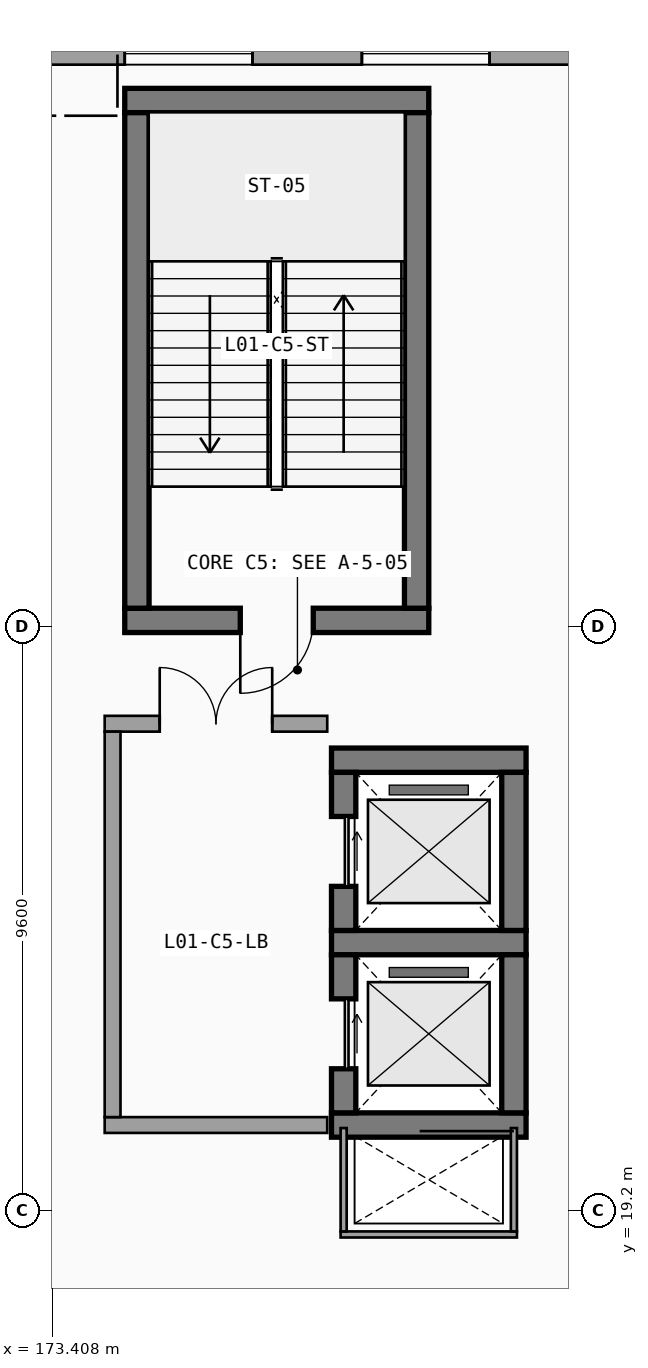
"""IFC4 building model, lengths in metres.
Left out: names, types, materials, properties, quantities, classifications, styles, units other than length and angle.
Written with IfcOpenShell. Run it as: python <this file> out.ifc"""

import sys

from ifc_helpers import new_model, si_unit, direction, frame, frame_2d, origin, place, context, subcontext, project, spatial, rectangle, extrude, element, fill, save


model = new_model("IFC4")
c1 = context("Model", 3, precision=1e-05, world=origin(), true_north=direction((0.0, 1.0)))
c2 = subcontext(c1, "Body", "Model", "MODEL_VIEW")
j1 = project(units=[si_unit("LENGTHUNIT", "METRE"), si_unit("PLANEANGLEUNIT", "RADIAN")], contexts=[c1])
p1 = place(None, origin())
s1 = spatial("IfcSite", under=j1, at=p1, CompositionType="ELEMENT")
p2 = place(p1, origin())
s2 = spatial("IfcBuilding", under=s1, at=p2, CompositionType="ELEMENT")
p3 = place(p2, frame((0.0, 0.0, 4.8)))
s3 = spatial("IfcBuildingStorey", under=s2, at=p3, CompositionType="ELEMENT", Elevation=4.8)
p4 = place(p3, frame((182.4, 38.22, 0.0), z_axis=(0.0, 0.0, 1.0), x_axis=(-1.0, 0.0, 0.0)))
e1 = element("IfcWall", 1, at=p4, inside=s3, PredefinedType="SOLIDWALL", context=c2, shape_type="SweptSolid", body=[
    extrude(rectangle(XDim=9.6, YDim=0.36, at=frame_2d((4.8, 0.0))), origin(), (0.0, 0.0, 1.0), 3.758),
])
p5 = place(p4, frame((3.9, 0.0, 0.9), z_axis=(0.0, 0.0, 1.0), x_axis=(-1.0, 0.0, 0.0)))
e2 = element("IfcOpeningElement", 2, at=p5, cuts=e1, PredefinedType="OPENING", context=c2, shape_type="SweptSolid", body=[
    extrude(rectangle(XDim=2.1, YDim=2.4, at=frame_2d((1.05, 1.2))), frame((0.0, 0.19, 0.0), z_axis=(0.0, -1.0, 0.0), x_axis=(1.0, 0.0, 0.0)), (0.0, 0.0, 1.0), 0.38),
])
p6 = place(p4, frame((7.8, 0.0, 0.9), z_axis=(0.0, 0.0, 1.0), x_axis=(-1.0, 0.0, 0.0)))
e3 = element("IfcOpeningElement", 3, at=p6, cuts=e1, PredefinedType="OPENING", context=c2, shape_type="SweptSolid", body=[
    extrude(rectangle(XDim=2.1, YDim=2.4, at=frame_2d((1.05, 1.2))), frame((0.0, 0.19, 0.0), z_axis=(0.0, -1.0, 0.0), x_axis=(1.0, 0.0, 0.0)), (0.0, 0.0, 1.0), 0.38),
])
p7 = place(p3, frame((174.6, 28.9, 0.0), z_axis=(0.0, 0.0, 1.0), x_axis=(1.0, 0.0, 0.0)))
e4 = element("IfcWall", 4, at=p7, inside=s3, PredefinedType="SHEAR", context=c2, shape_type="SweptSolid", body=[
    extrude(rectangle(XDim=5.0, YDim=0.4, at=frame_2d((2.5, 0.0))), origin(), (0.0, 0.0, 1.0), 4.52),
])
p8 = place(p7, frame((3.1, 0.0, 0.0), z_axis=(0.0, 0.0, 1.0), x_axis=(-1.0, 0.0, 0.0)))
e5 = element("IfcOpeningElement", 5, at=p8, cuts=e4, PredefinedType="OPENING", context=c2, shape_type="SweptSolid", body=[
    extrude(rectangle(XDim=1.2, YDim=2.2, at=frame_2d((0.6, 1.1))), frame((0.0, 0.21, 0.0), z_axis=(0.0, -1.0, 0.0), x_axis=(1.0, 0.0, 0.0)), (0.0, 0.0, 1.0), 0.42),
])
p9 = place(p3, frame((179.6, 37.45, 0.0), z_axis=(0.0, 0.0, 1.0), x_axis=(-1.0, 0.0, 0.0)))
e6 = element("IfcWall", 6, at=p9, inside=s3, PredefinedType="SHEAR", context=c2, shape_type="SweptSolid", body=[
    extrude(rectangle(XDim=5.0, YDim=0.4, at=frame_2d((2.5, 0.0))), origin(), (0.0, 0.0, 1.0), 4.52),
])
for number, where, z_axis, x_axis in (
    (7, (174.8, 37.25, 0.0), (0.0, 0.0, 1.0), (0.0, -1.0, 0.0)),
    (8, (179.4, 29.1, 0.0), (0.0, 0.0, 1.0), (0.0, 1.0, 0.0)),
):
    element("IfcWall", number, at=place(p3, frame(where, z_axis=z_axis, x_axis=x_axis)), inside=s3, PredefinedType="SHEAR", context=c2, shape_type="SweptSolid", body=[
        extrude(rectangle(XDim=8.15, YDim=0.4, at=frame_2d((4.075, 0.0))), origin(), (0.0, 0.0, 1.0), 4.52),
    ])
for number, where, z_axis, x_axis in (
    (9, (178.0, 20.6, 0.0), (0.0, 0.0, 1.0), (1.0, 0.0, 0.0)),
    (10, (181.2, 23.6, 0.0), (0.0, 0.0, 1.0), (-1.0, 0.0, 0.0)),
):
    element("IfcWall", number, at=place(p3, frame(where, z_axis=z_axis, x_axis=x_axis)), inside=s3, PredefinedType="SHEAR", context=c2, shape_type="SweptSolid", body=[
        extrude(rectangle(XDim=3.2, YDim=0.4, at=frame_2d((1.6, 0.0))), origin(), (0.0, 0.0, 1.0), 4.52),
    ])
p10 = place(p3, frame((178.2, 23.4, 0.0), z_axis=(0.0, 0.0, 1.0), x_axis=(0.0, -1.0, 0.0)))
e11 = element("IfcWall", 11, at=p10, inside=s3, PredefinedType="SHEAR", context=c2, shape_type="SweptSolid", body=[
    extrude(rectangle(XDim=2.6, YDim=0.4, at=frame_2d((1.3, 0.0))), origin(), (0.0, 0.0, 1.0), 4.52),
])
p11 = place(p10, frame((0.725, 0.0, 0.0), z_axis=(0.0, 0.0, 1.0), x_axis=(1.0, 0.0, 0.0)))
e12 = element("IfcOpeningElement", 12, at=p11, cuts=e11, PredefinedType="OPENING", context=c2, shape_type="SweptSolid", body=[
    extrude(rectangle(XDim=1.15, YDim=2.2, at=frame_2d((0.575, 1.1))), frame((0.0, 0.21, 0.0), z_axis=(0.0, -1.0, 0.0), x_axis=(1.0, 0.0, 0.0)), (0.0, 0.0, 1.0), 0.42),
])
p12 = place(p3, frame((181.0, 20.8, 0.0), z_axis=(0.0, 0.0, 1.0), x_axis=(0.0, 1.0, 0.0)))
e13 = element("IfcWall", 13, at=p12, inside=s3, PredefinedType="SHEAR", context=c2, shape_type="SweptSolid", body=[
    extrude(rectangle(XDim=2.6, YDim=0.4, at=frame_2d((1.3, 0.0))), origin(), (0.0, 0.0, 1.0), 4.52),
])
p13 = place(p3, frame((181.2, 26.6, 0.0), z_axis=(0.0, 0.0, 1.0), x_axis=(-1.0, 0.0, 0.0)))
e14 = element("IfcWall", 14, at=p13, inside=s3, PredefinedType="SHEAR", context=c2, shape_type="SweptSolid", body=[
    extrude(rectangle(XDim=3.2, YDim=0.4, at=frame_2d((1.6, 0.0))), origin(), (0.0, 0.0, 1.0), 4.52),
])
p14 = place(p3, frame((178.2, 26.4, 0.0), z_axis=(0.0, 0.0, 1.0), x_axis=(0.0, -1.0, 0.0)))
e15 = element("IfcWall", 15, at=p14, inside=s3, PredefinedType="SHEAR", context=c2, shape_type="SweptSolid", body=[
    extrude(rectangle(XDim=2.6, YDim=0.4, at=frame_2d((1.3, 0.0))), origin(), (0.0, 0.0, 1.0), 4.52),
])
p15 = place(p14, frame((0.725, 0.0, 0.0), z_axis=(0.0, 0.0, 1.0), x_axis=(1.0, 0.0, 0.0)))
e16 = element("IfcOpeningElement", 16, at=p15, cuts=e15, PredefinedType="OPENING", context=c2, shape_type="SweptSolid", body=[
    extrude(rectangle(XDim=1.15, YDim=2.2, at=frame_2d((0.575, 1.1))), frame((0.0, 0.21, 0.0), z_axis=(0.0, -1.0, 0.0), x_axis=(1.0, 0.0, 0.0)), (0.0, 0.0, 1.0), 0.42),
])
p16 = place(p3, frame((181.0, 23.8, 0.0), z_axis=(0.0, 0.0, 1.0), x_axis=(0.0, 1.0, 0.0)))
e17 = element("IfcWall", 17, at=p16, inside=s3, PredefinedType="SHEAR", context=c2, shape_type="SweptSolid", body=[
    extrude(rectangle(XDim=2.6, YDim=0.4, at=frame_2d((1.3, 0.0))), origin(), (0.0, 0.0, 1.0), 4.52),
])
p17 = place(p3, frame((178.15, 18.8, 0.0), z_axis=(0.0, 0.0, 1.0), x_axis=(1.0, 0.0, 0.0)))
e18 = element("IfcWall", 18, at=p17, inside=s3, PredefinedType="PARTITIONING", context=c2, shape_type="SweptSolid", body=[
    extrude(rectangle(XDim=2.9, YDim=0.1, at=frame_2d((1.45, 0.0))), origin(), (0.0, 0.0, 1.0), 4.52),
])
for number, where, z_axis, x_axis in (
    (19, (178.2, 20.55, 0.0), (0.0, 0.0, 1.0), (0.0, -1.0, 0.0)),
    (20, (181.0, 18.85, 0.0), (0.0, 0.0, 1.0), (0.0, 1.0, 0.0)),
):
    element("IfcWall", number, at=place(p3, frame(where, z_axis=z_axis, x_axis=x_axis)), inside=s3, PredefinedType="PARTITIONING", context=c2, shape_type="SweptSolid", body=[
        extrude(rectangle(XDim=1.7, YDim=0.1, at=frame_2d((0.85, 0.0))), origin(), (0.0, 0.0, 1.0), 4.52),
    ])
p18 = place(p3, frame((174.27, 20.6, 0.0), z_axis=(0.0, 0.0, 1.0), x_axis=(1.0, 0.0, 0.0)))
e21 = element("IfcWall", 21, at=p18, inside=s3, PredefinedType="SOLIDWALL", context=c2, shape_type="SweptSolid", body=[
    extrude(rectangle(XDim=3.66, YDim=0.26, at=frame_2d((1.83, 0.0))), origin(), (0.0, 0.0, 1.0), 4.52),
])
p19 = place(p3, frame((177.93, 27.2, 0.0), z_axis=(0.0, 0.0, 1.0), x_axis=(-1.0, 0.0, 0.0)))
e22 = element("IfcWall", 22, at=p19, inside=s3, PredefinedType="SOLIDWALL", context=c2, shape_type="SweptSolid", body=[
    extrude(rectangle(XDim=3.66, YDim=0.26, at=frame_2d((1.83, 0.0))), origin(), (0.0, 0.0, 1.0), 4.52),
])
p20 = place(p19, frame((2.755, 0.0, 0.0), z_axis=(0.0, 0.0, 1.0), x_axis=(-1.0, 0.0, 0.0)))
e23 = element("IfcOpeningElement", 23, at=p20, cuts=e22, PredefinedType="OPENING", context=c2, shape_type="SweptSolid", body=[
    extrude(rectangle(XDim=1.85, YDim=2.25, at=frame_2d((0.925, 1.125))), frame((0.0, 0.14, 0.0), z_axis=(0.0, -1.0, 0.0), x_axis=(1.0, 0.0, 0.0)), (0.0, 0.0, 1.0), 0.28),
])
p21 = place(p3, frame((174.4, 27.07, 0.0), z_axis=(0.0, 0.0, 1.0), x_axis=(0.0, -1.0, 0.0)))
e24 = element("IfcWall", 24, at=p21, inside=s3, PredefinedType="SOLIDWALL", context=c2, shape_type="SweptSolid", body=[
    extrude(rectangle(XDim=6.34, YDim=0.26, at=frame_2d((3.17, 0.0))), origin(), (0.0, 0.0, 1.0), 4.52),
])
p22 = place(p5, origin())
e25 = element("IfcWindow", 25, at=p22, inside=s3, PartitioningType="SINGLE_PANEL", PredefinedType="WINDOW", context=c2, shape_type="SweptSolid", body=[
    extrude(rectangle(XDim=2.1, YDim=2.4, at=frame_2d((1.05, 1.2))), frame((0.0, 0.03, 0.0), z_axis=(0.0, -1.0, 0.0), x_axis=(1.0, 0.0, 0.0)), (0.0, 0.0, 1.0), 0.06),
])
fill(e2, e25)
p23 = place(p6, origin())
e26 = element("IfcWindow", 26, at=p23, inside=s3, PartitioningType="SINGLE_PANEL", PredefinedType="WINDOW", context=c2, shape_type="SweptSolid", body=[
    extrude(rectangle(XDim=2.1, YDim=2.4, at=frame_2d((1.05, 1.2))), frame((0.0, 0.03, 0.0), z_axis=(0.0, -1.0, 0.0), x_axis=(1.0, 0.0, 0.0)), (0.0, 0.0, 1.0), 0.06),
])
fill(e3, e26)
p24 = place(p8, origin())
e27 = element("IfcDoor", 27, at=p24, inside=s3, OperationType="SINGLE_SWING_RIGHT", PredefinedType="DOOR", context=c2, shape_type="SweptSolid", body=[
    extrude(rectangle(XDim=1.2, YDim=2.2, at=frame_2d((0.6, 1.1))), frame((0.0, 0.025, 0.0), z_axis=(0.0, -1.0, 0.0), x_axis=(1.0, 0.0, 0.0)), (0.0, 0.0, 1.0), 0.05),
])
fill(e5, e27)
p25 = place(p11, origin())
e28 = element("IfcDoor", 28, at=p25, inside=s3, OperationType="SLIDING_TO_LEFT", PredefinedType="DOOR", context=c2, shape_type="SweptSolid", body=[
    extrude(rectangle(XDim=1.15, YDim=2.2, at=frame_2d((0.575, 1.1))), frame((0.0, 0.025, 0.0), z_axis=(0.0, -1.0, 0.0), x_axis=(1.0, 0.0, 0.0)), (0.0, 0.0, 1.0), 0.05),
])
fill(e12, e28)
p26 = place(p15, origin())
e29 = element("IfcDoor", 29, at=p26, inside=s3, OperationType="SLIDING_TO_LEFT", PredefinedType="DOOR", context=c2, shape_type="SweptSolid", body=[
    extrude(rectangle(XDim=1.15, YDim=2.2, at=frame_2d((0.575, 1.1))), frame((0.0, 0.025, 0.0), z_axis=(0.0, -1.0, 0.0), x_axis=(1.0, 0.0, 0.0)), (0.0, 0.0, 1.0), 0.05),
])
fill(e16, e29)
p27 = place(p20, origin())
e30 = element("IfcDoor", 30, at=p27, inside=s3, OperationType="DOUBLE_DOOR_SINGLE_SWING", PredefinedType="DOOR", context=c2, shape_type="SweptSolid", body=[
    extrude(rectangle(XDim=1.85, YDim=2.25, at=frame_2d((0.925, 1.125))), frame((0.0, 0.025, 0.0), z_axis=(0.0, -1.0, 0.0), x_axis=(1.0, 0.0, 0.0)), (0.0, 0.0, 1.0), 0.05),
])
fill(e23, e30)
save(model, sys.argv[1])
